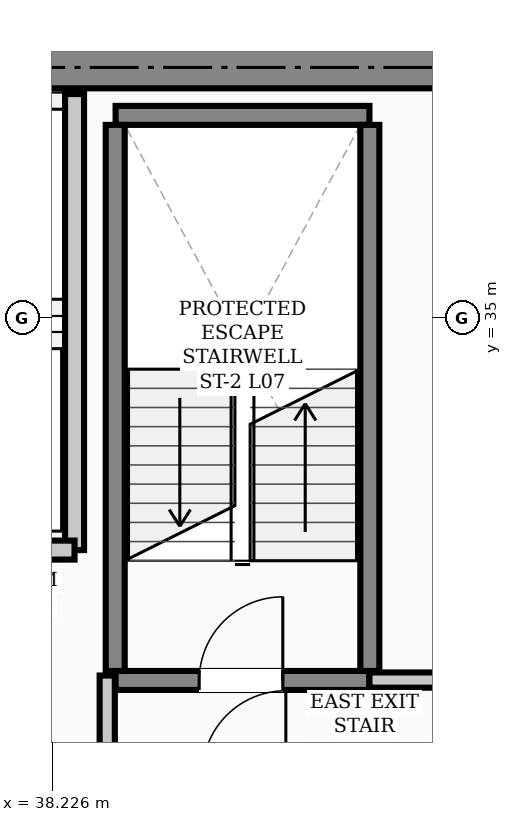
"""IFC4 building model, lengths in metres.
Left out: names, types, materials, properties, quantities, classifications, styles, units other than length and angle.
Written with IfcOpenShell. Run it as: python <this file> out.ifc"""

import sys

from ifc_helpers import new_model, si_unit, direction, frame, frame_2d, origin, place, context, subcontext, project, spatial, rectangle, extrude, element, fill, save


model = new_model("IFC4")
c1 = context("Model", 3, precision=1e-05, world=origin(), true_north=direction((0.0, 1.0)))
c2 = subcontext(c1, "Body", "Model", "MODEL_VIEW")
j1 = project(units=[si_unit("LENGTHUNIT", "METRE"), si_unit("PLANEANGLEUNIT", "RADIAN")], contexts=[c1])
p1 = place(None, origin())
s1 = spatial("IfcSite", under=j1, at=p1, CompositionType="ELEMENT")
p2 = place(p1, origin())
s2 = spatial("IfcBuilding", under=s1, at=p2, CompositionType="ELEMENT")
p3 = place(p2, frame((0.0, 0.0, 30.4)))
s3 = spatial("IfcBuildingStorey", under=s2, at=p3, CompositionType="ELEMENT", Elevation=30.4)
p4 = place(p3, frame((13.5, 38.3, 0.0), z_axis=(0.0, 0.0, 1.0), x_axis=(1.0, 0.0, 0.0)))
e1 = element("IfcWall", 1, at=p4, inside=s3, PredefinedType="SHEAR", context=c2, shape_type="SweptSolid", body=[
    extrude(rectangle(XDim=30.5, YDim=0.55, at=frame_2d((15.25, 0.0))), origin(), (0.0, 0.0, 1.0), 3.72),
])
p5 = place(p3, frame((39.06, 30.235, 0.0), z_axis=(0.0, 0.0, 1.0), x_axis=(1.0, 0.0, 0.0)))
e2 = element("IfcWall", 2, at=p5, inside=s3, PredefinedType="STANDARD", context=c2, shape_type="SweptSolid", body=[
    extrude(rectangle(XDim=3.34, YDim=0.25, at=frame_2d((1.67, 0.0))), origin(), (0.0, 0.0, 1.0), 3.72),
])
p6 = place(p5, frame((1.1, 0.0, 0.0)))
e3 = element("IfcOpeningElement", 3, at=p6, cuts=e2, PredefinedType="OPENING", context=c2, shape_type="SweptSolid", body=[
    extrude(rectangle(XDim=1.1, YDim=2.08, at=frame_2d((0.55, 1.04))), frame((0.0, 0.135, 0.0), z_axis=(0.0, -1.0, 0.0), x_axis=(1.0, 0.0, 0.0)), (0.0, 0.0, 1.0), 0.27),
])
p7 = place(p3, frame((39.06, 37.669, 0.0), z_axis=(0.0, 0.0, 1.0), x_axis=(1.0, 0.0, 0.0)))
e4 = element("IfcWall", 4, at=p7, inside=s3, PredefinedType="STANDARD", context=c2, shape_type="SweptSolid", body=[
    extrude(rectangle(XDim=3.34, YDim=0.25, at=frame_2d((1.67, 0.0))), origin(), (0.0, 0.0, 1.0), 3.72),
])
for number, where, z_axis, x_axis in (
    (5, (39.055, 30.36, 0.0), (0.0, 0.0, 1.0), (0.0, 1.0, 0.0)),
    (6, (42.405, 30.36, 0.0), (0.0, 0.0, 1.0), (0.0, 1.0, 0.0)),
):
    element("IfcWall", number, at=place(p3, frame(where, z_axis=z_axis, x_axis=x_axis)), inside=s3, PredefinedType="STANDARD", context=c2, shape_type="SweptSolid", body=[
        extrude(rectangle(XDim=7.184, YDim=0.25, at=frame_2d((3.592, 0.0))), origin(), (0.0, 0.0, 1.0), 3.72),
    ])
p8 = place(p3, frame((38.52, 31.95, 0.0), z_axis=(0.0, 0.0, 1.0), x_axis=(0.0, 1.0, 0.0)))
e7 = element("IfcWall", 7, at=p8, inside=s3, PredefinedType="STANDARD", context=c2, shape_type="SweptSolid", body=[
    extrude(rectangle(XDim=6.0, YDim=0.25, at=frame_2d((3.0, 0.0))), origin(), (0.0, 0.0, 1.0), 3.3),
])
p9 = place(p3, frame((36.62, 31.95, 0.0), z_axis=(0.0, 0.0, 1.0), x_axis=(1.0, 0.0, 0.0)))
e8 = element("IfcWall", 8, at=p9, inside=s3, PredefinedType="STANDARD", context=c2, shape_type="SweptSolid", body=[
    extrude(rectangle(XDim=1.9, YDim=0.25, at=frame_2d((0.95, 0.0))), origin(), (0.0, 0.0, 1.0), 3.48),
])
p10 = place(p3, frame((42.4, 30.24, 0.0), z_axis=(0.0, 0.0, 1.0), x_axis=(1.0, 0.0, 0.0)))
e9 = element("IfcWall", 9, at=p10, inside=s3, PredefinedType="STANDARD", context=c2, shape_type="SweptSolid", body=[
    extrude(rectangle(XDim=1.315, YDim=0.2, at=frame_2d((0.658, 0.0))), origin(), (0.0, 0.0, 1.0), 3.1),
])
p11 = place(p3, frame((38.95, 29.285, 0.0), z_axis=(0.0, 0.0, 1.0), x_axis=(0.0, 1.0, 0.0)))
e10 = element("IfcWall", 10, at=p11, inside=s3, PredefinedType="STANDARD", context=c2, shape_type="SweptSolid", body=[
    extrude(rectangle(XDim=1.015, YDim=0.2, at=frame_2d((0.508, 0.0))), origin(), (0.0, 0.0, 1.0), 3.3),
])
p12 = place(p6, origin())
e11 = element("IfcDoor", 11, at=p12, inside=s3, OperationType="SINGLE_SWING_RIGHT", PredefinedType="DOOR", context=c2, shape_type="SweptSolid", body=[
    extrude(rectangle(XDim=1.1, YDim=2.08, at=frame_2d((0.55, 1.04))), frame((0.0, 0.025, 0.0), z_axis=(0.0, -1.0, 0.0), x_axis=(1.0, 0.0, 0.0)), (0.0, 0.0, 1.0), 0.05),
])
fill(e3, e11)
save(model, sys.argv[1])
